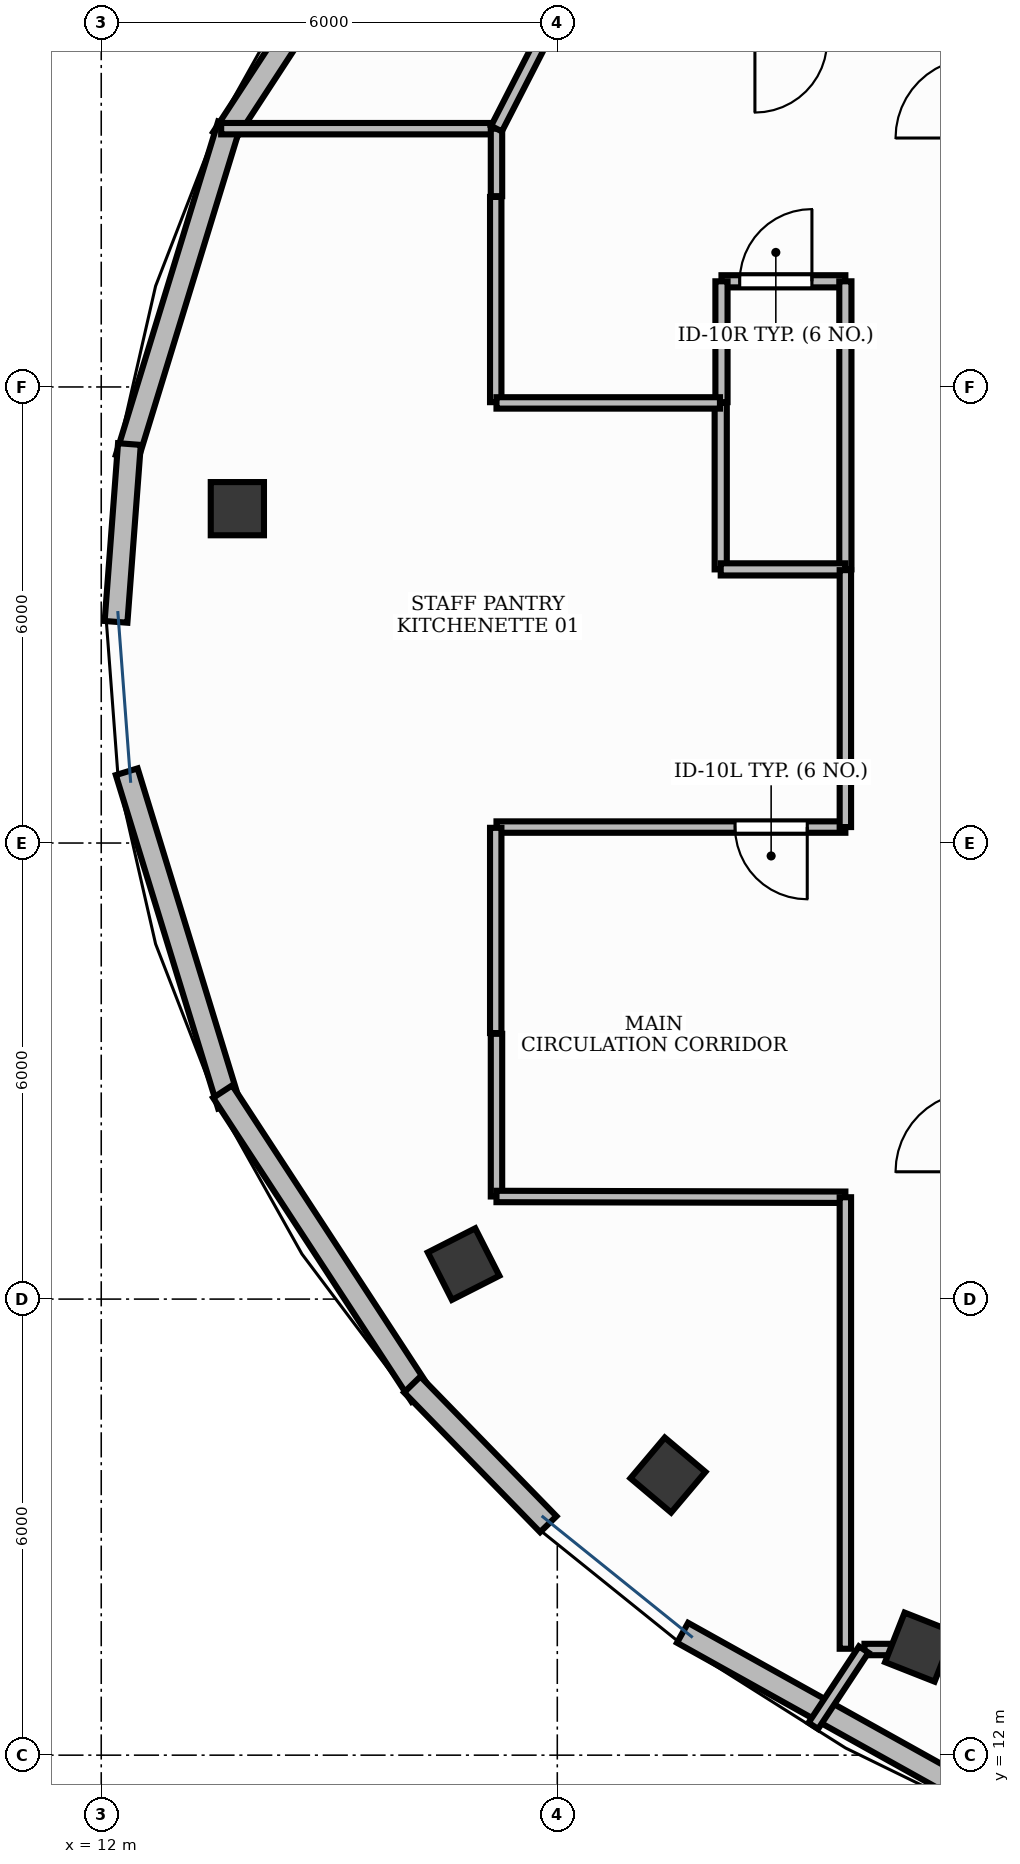
"""IFC4 building model, lengths in metres.
Left out: names, types, materials, properties, quantities, classifications, styles, units other than length and angle.
Written with IfcOpenShell. Run it as: python <this file> out.ifc"""

import sys

from ifc_helpers import new_model, si_unit, direction, frame, frame_2d, origin, origin_2d, place, context, subcontext, project, spatial, rectangle, extrude, element, fill, save


model = new_model("IFC4")
c1 = context("Model", 3, precision=1e-05, world=origin(), true_north=direction((0.0, 1.0)))
c2 = subcontext(c1, "Body", "Model", "MODEL_VIEW")
j1 = project(units=[si_unit("LENGTHUNIT", "METRE"), si_unit("PLANEANGLEUNIT", "RADIAN")], contexts=[c1])
p1 = place(None, origin())
s1 = spatial("IfcSite", under=j1, at=p1, CompositionType="ELEMENT")
p2 = place(p1, origin())
s2 = spatial("IfcBuilding", under=s1, at=p2, CompositionType="ELEMENT")
p3 = place(p2, frame((0.0, 0.0, 314.4)))
s3 = spatial("IfcBuildingStorey", under=s2, at=p3, CompositionType="ELEMENT", Elevation=314.4)
for number, where, z_axis, x_axis in (
    (1, (13.791, 28.399, -0.0), (0.0, 0.0, 1.0), (0.0, 1.0, 0.0)),
    (2, (16.767, 18.46, -0.0), (0.0, 0.0, 1.0), (-0.453, 0.891, 0.0)),
    (3, (19.456, 15.685, -0.0), (0.0, 0.0, 1.0), (-0.764, 0.645, 0.0)),
    (4, (22.766, 13.421, -0.0), (0.0, 0.0, 1.0), (-0.93, 0.367, 0.0)),
):
    element("IfcColumn", number, at=place(p3, frame(where, z_axis=z_axis, x_axis=x_axis)), inside=s3, PredefinedType="COLUMN", context=c2, shape_type="SweptSolid", body=[
        extrude(rectangle(XDim=0.7, YDim=0.7, at=origin_2d()), origin(), (0.0, 0.0, 1.0), 3.901),
    ])
p4 = place(p3, frame((16.208, 37.269, 0.0), z_axis=(0.0, 0.0, 1.0), x_axis=(-0.546723072071, -0.837313491152, 0.0)))
e5 = element("IfcWall", 5, at=p4, inside=s3, PredefinedType="STANDARD", context=c2, shape_type="SweptSolid", body=[
    extrude(rectangle(XDim=4.775, YDim=0.3, at=frame_2d((2.388, 0.0))), origin(), (0.0, 0.0, 1.0), 3.9),
])
p5 = place(p3, frame((13.681, 33.449, 0.0), z_axis=(0.0, 0.0, 1.0), x_axis=(-0.293311854667, -0.956016817797, 0.0)))
e6 = element("IfcWall", 6, at=p5, inside=s3, PredefinedType="STANDARD", context=c2, shape_type="SweptSolid", body=[
    extrude(rectangle(XDim=4.589, YDim=0.3, at=frame_2d((2.294, 0.0))), origin(), (0.0, 0.0, 1.0), 3.9),
])
p6 = place(p3, frame((12.371, 29.249, 0.0), z_axis=(0.0, 0.0, 1.0), x_axis=(-0.075040925575, -0.997180454827, 0.0)))
e7 = element("IfcWall", 7, at=p6, inside=s3, PredefinedType="STANDARD", context=c2, shape_type="SweptSolid", body=[
    extrude(rectangle(XDim=2.346, YDim=0.3, at=frame_2d((1.173, 0.0))), origin(), (0.0, 0.0, 1.0), 3.9),
])
p7 = place(p3, frame((12.335, 24.938, 0.0), z_axis=(0.0, 0.0, 1.0), x_axis=(0.293311854667, -0.956016817797, 0.0)))
e8 = element("IfcWall", 8, at=p7, inside=s3, PredefinedType="STANDARD", context=c2, shape_type="SweptSolid", body=[
    extrude(rectangle(XDim=4.589, YDim=0.3, at=frame_2d((2.294, 0.0))), origin(), (0.0, 0.0, 1.0), 3.9),
])
p8 = place(p3, frame((13.598, 20.73, 0.0), z_axis=(0.0, 0.0, 1.0), x_axis=(0.546723072071, -0.837313491152, 0.0)))
e9 = element("IfcWall", 9, at=p8, inside=s3, PredefinedType="STANDARD", context=c2, shape_type="SweptSolid", body=[
    extrude(rectangle(XDim=4.775, YDim=0.3, at=frame_2d((2.388, 0.0))), origin(), (0.0, 0.0, 1.0), 3.9),
])
p9 = place(p3, frame((16.092, 16.877, 0.0), z_axis=(0.0, 0.0, 1.0), x_axis=(0.697621825822, -0.716466180735, 0.0)))
e10 = element("IfcWall", 10, at=p9, inside=s3, PredefinedType="STANDARD", context=c2, shape_type="SweptSolid", body=[
    extrude(rectangle(XDim=2.565, YDim=0.3, at=frame_2d((1.283, 0.0))), origin(), (0.0, 0.0, 1.0), 3.9),
])
p10 = place(p3, frame((19.648, 13.61, 0.0), z_axis=(0.0, 0.0, 1.0), x_axis=(0.87350676692, -0.486812004932, 0.0)))
e11 = element("IfcWall", 11, at=p10, inside=s3, PredefinedType="STANDARD", context=c2, shape_type="SweptSolid", body=[
    extrude(rectangle(XDim=5.282, YDim=0.3, at=frame_2d((2.641, 0.0))), origin(), (0.0, 0.0, 1.0), 3.9),
])
p11 = place(p3, frame((20.16, 31.39, 0.0), z_axis=(0.0, 0.0, 1.0), x_axis=(1.0, 0.0, 0.0)))
e12 = element("IfcWall", 12, at=p11, inside=s3, PredefinedType="PARTITIONING", context=c2, shape_type="SweptSolid", body=[
    extrude(rectangle(XDim=1.63, YDim=0.16, at=frame_2d((0.815, 0.0))), origin(), (0.0, 0.0, 1.0), 2.22),
])
p12 = place(p11, frame((0.24, 0.0, 0.0)))
e13 = element("IfcOpeningElement", 13, at=p12, cuts=e12, PredefinedType="OPENING", context=c2, shape_type="SweptSolid", body=[
    extrude(rectangle(XDim=0.95, YDim=2.15, at=frame_2d((0.475, 1.075))), frame((0.0, 0.095, 0.0), z_axis=(0.0, -1.0, 0.0), x_axis=(1.0, 0.0, 0.0)), (0.0, 0.0, 1.0), 0.19),
])
p13 = place(p3, frame((21.79, 24.21, 0.0), z_axis=(0.0, 0.0, 1.0), x_axis=(-1.0, 0.0, 0.0)))
e14 = element("IfcWall", 14, at=p13, inside=s3, PredefinedType="PARTITIONING", context=c2, shape_type="SweptSolid", body=[
    extrude(rectangle(XDim=4.59, YDim=0.15, at=frame_2d((2.295, 0.0))), origin(), (0.0, 0.0, 1.0), 2.22),
])
p14 = place(p13, frame((0.502, 0.0, 0.0)))
e15 = element("IfcOpeningElement", 15, at=p14, cuts=e14, PredefinedType="OPENING", context=c2, shape_type="SweptSolid", body=[
    extrude(rectangle(XDim=0.95, YDim=2.15, at=frame_2d((0.475, 1.075))), frame((0.0, 0.09, 0.0), z_axis=(0.0, -1.0, 0.0), x_axis=(1.0, 0.0, 0.0)), (0.0, 0.0, 1.0), 0.18),
])
p15 = place(p3, frame((22.041, 13.39, 0.0), z_axis=(0.0, 0.0, 1.0), x_axis=(1.0, 0.0, 0.0)))
e16 = element("IfcWall", 16, at=p15, inside=s3, PredefinedType="PARTITIONING", context=c2, shape_type="SweptSolid", body=[
    extrude(rectangle(XDim=17.359, YDim=0.15, at=frame_2d((8.679, 0.0))), origin(), (0.0, 0.0, 1.0), 2.22),
])
p16 = place(p15, frame((8.634, 0.0, 0.0)))
e17 = element("IfcOpeningElement", 17, at=p16, cuts=e16, PredefinedType="OPENING", context=c2, shape_type="SweptSolid", body=[
    extrude(rectangle(XDim=0.95, YDim=2.15, at=frame_2d((0.475, 1.075))), frame((0.0, 0.09, 0.0), z_axis=(0.0, -1.0, 0.0), x_axis=(1.0, 0.0, 0.0)), (0.0, 0.0, 1.0), 0.18),
])
p17 = place(p3, frame((20.15, 27.6, 0.0), z_axis=(0.0, 0.0, 1.0), x_axis=(0.0, 1.0, 0.0)))
e18 = element("IfcWall", 18, at=p17, inside=s3, PredefinedType="PARTITIONING", context=c2, shape_type="SweptSolid", body=[
    extrude(rectangle(XDim=2.19, YDim=0.16, at=frame_2d((1.095, 0.0))), origin(), (0.0, 0.0, 1.0), 2.22),
])
p18 = place(p3, frame((20.16, 29.8, 0.0), z_axis=(0.0, 0.0, 1.0), x_axis=(0.0, 1.0, 0.0)))
e19 = element("IfcWall", 19, at=p18, inside=s3, PredefinedType="PARTITIONING", context=c2, shape_type="SweptSolid", body=[
    extrude(rectangle(XDim=1.59, YDim=0.16, at=frame_2d((0.795, 0.0))), origin(), (0.0, 0.0, 1.0), 2.22),
])
p19 = place(p3, frame((21.79, 31.39, 0.0), z_axis=(0.0, 0.0, 1.0), x_axis=(0.0, -1.0, 0.0)))
e20 = element("IfcWall", 20, at=p19, inside=s3, PredefinedType="PARTITIONING", context=c2, shape_type="SweptSolid", body=[
    extrude(rectangle(XDim=3.79, YDim=0.16, at=frame_2d((1.895, 0.0))), origin(), (0.0, 0.0, 1.0), 2.22),
])
p20 = place(p3, frame((21.79, 27.6, 0.0), z_axis=(0.0, 0.0, 1.0), x_axis=(-1.0, 0.0, 0.0)))
e21 = element("IfcWall", 21, at=p20, inside=s3, PredefinedType="PARTITIONING", context=c2, shape_type="SweptSolid", body=[
    extrude(rectangle(XDim=1.64, YDim=0.16, at=frame_2d((0.82, 0.0))), origin(), (0.0, 0.0, 1.0), 2.22),
])
p21 = place(p3, frame((13.578, 33.398, 0.0), z_axis=(0.0, 0.0, 1.0), x_axis=(1.0, 0.0, 0.0)))
e22 = element("IfcWall", 22, at=p21, inside=s3, PredefinedType="PARTITIONING", context=c2, shape_type="SweptSolid", body=[
    extrude(rectangle(XDim=3.622, YDim=0.15, at=frame_2d((1.811, 0.0))), origin(), (0.0, 0.0, 1.0), 2.22),
])
p22 = place(p3, frame((17.2, 33.398, 0.0), z_axis=(0.0, 0.0, 1.0), x_axis=(0.0, -1.0, 0.0)))
e23 = element("IfcWall", 23, at=p22, inside=s3, PredefinedType="PARTITIONING", context=c2, shape_type="SweptSolid", body=[
    extrude(rectangle(XDim=0.888, YDim=0.15, at=frame_2d((0.444, 0.0))), origin(), (0.0, 0.0, 1.0), 2.22),
])
p23 = place(p3, frame((17.19, 32.5, 0.0), z_axis=(0.0, 0.0, 1.0), x_axis=(0.0, -1.0, 0.0)))
e24 = element("IfcWall", 24, at=p23, inside=s3, PredefinedType="PARTITIONING", context=c2, shape_type="SweptSolid", body=[
    extrude(rectangle(XDim=2.7, YDim=0.15, at=frame_2d((1.35, 0.0))), origin(), (0.0, 0.0, 1.0), 2.22),
])
p24 = place(p3, frame((17.2, 29.79, 0.0), z_axis=(0.0, 0.0, 1.0), x_axis=(1.0, 0.0, 0.0)))
e25 = element("IfcWall", 25, at=p24, inside=s3, PredefinedType="PARTITIONING", context=c2, shape_type="SweptSolid", body=[
    extrude(rectangle(XDim=2.94, YDim=0.15, at=frame_2d((1.47, 0.0))), origin(), (0.0, 0.0, 1.0), 2.22),
])
p25 = place(p3, frame((21.79, 27.59, 0.0), z_axis=(0.0, 0.0, 1.0), x_axis=(0.0, -1.0, 0.0)))
e26 = element("IfcWall", 26, at=p25, inside=s3, PredefinedType="PARTITIONING", context=c2, shape_type="SweptSolid", body=[
    extrude(rectangle(XDim=3.38, YDim=0.15, at=frame_2d((1.69, 0.0))), origin(), (0.0, 0.0, 1.0), 2.22),
])
p26 = place(p3, frame((17.19, 24.2, 0.0), z_axis=(0.0, 0.0, 1.0), x_axis=(0.0, -1.0, 0.0)))
e27 = element("IfcWall", 27, at=p26, inside=s3, PredefinedType="PARTITIONING", context=c2, shape_type="SweptSolid", body=[
    extrude(rectangle(XDim=2.7, YDim=0.15, at=frame_2d((1.35, 0.0))), origin(), (0.0, 0.0, 1.0), 2.22),
])
p27 = place(p3, frame((17.2, 21.49, 0.0), z_axis=(0.0, 0.0, 1.0), x_axis=(0.0, -1.0, 0.0)))
e28 = element("IfcWall", 28, at=p27, inside=s3, PredefinedType="PARTITIONING", context=c2, shape_type="SweptSolid", body=[
    extrude(rectangle(XDim=2.14, YDim=0.15, at=frame_2d((1.07, 0.0))), origin(), (0.0, 0.0, 1.0), 2.22),
])
p28 = place(p3, frame((17.2, 19.35, 0.0), z_axis=(0.0, 0.0, 1.0), x_axis=(0.999997622206, -0.002180729882, 0.0)))
e29 = element("IfcWall", 29, at=p28, inside=s3, PredefinedType="PARTITIONING", context=c2, shape_type="SweptSolid", body=[
    extrude(rectangle(XDim=4.59, YDim=0.15, at=frame_2d((2.295, 0.0))), origin(), (0.0, 0.0, 1.0), 2.22),
])
p29 = place(p3, frame((21.79, 19.34, 0.0), z_axis=(0.0, 0.0, 1.0), x_axis=(0.0, -1.0, 0.0)))
e30 = element("IfcWall", 30, at=p29, inside=s3, PredefinedType="PARTITIONING", context=c2, shape_type="SweptSolid", body=[
    extrude(rectangle(XDim=5.94, YDim=0.15, at=frame_2d((2.97, 0.0))), origin(), (0.0, 0.0, 1.0), 2.22),
])
p30 = place(p3, frame((22.031, 13.39, 0.0), z_axis=(0.0, 0.0, 1.0), x_axis=(-0.550618818577, -0.834756800888, 0.0)))
e31 = element("IfcWall", 31, at=p30, inside=s3, PredefinedType="PARTITIONING", context=c2, shape_type="SweptSolid", body=[
    extrude(rectangle(XDim=1.203, YDim=0.15, at=frame_2d((0.602, 0.0))), origin(), (0.0, 0.0, 1.0), 2.22),
])
p31 = place(p3, frame((17.79, 34.55, 0.0), z_axis=(0.0, 0.0, 1.0), x_axis=(-0.455868581402, -0.890047097906, 0.0)))
e32 = element("IfcWall", 32, at=p31, inside=s3, PredefinedType="PARTITIONING", context=c2, shape_type="SweptSolid", body=[
    extrude(rectangle(XDim=1.294, YDim=0.16, at=frame_2d((0.647, 0.0))), origin(), (0.0, 0.0, 1.0), 2.22),
])
p32 = place(p12, origin())
e33 = element("IfcDoor", 33, at=p32, inside=s3, OperationType="SINGLE_SWING_RIGHT", PredefinedType="DOOR", context=c2, shape_type="SweptSolid", body=[
    extrude(rectangle(XDim=0.95, YDim=2.15, at=frame_2d((0.475, 1.075))), frame((0.0, 0.025, 0.0), z_axis=(0.0, -1.0, 0.0), x_axis=(1.0, 0.0, 0.0)), (0.0, 0.0, 1.0), 0.05),
])
fill(e13, e33)
p33 = place(p14, origin())
e34 = element("IfcDoor", 34, at=p33, inside=s3, OperationType="SINGLE_SWING_LEFT", PredefinedType="DOOR", context=c2, shape_type="SweptSolid", body=[
    extrude(rectangle(XDim=0.95, YDim=2.15, at=frame_2d((0.475, 1.075))), frame((0.0, 0.025, 0.0), z_axis=(0.0, -1.0, 0.0), x_axis=(1.0, 0.0, 0.0)), (0.0, 0.0, 1.0), 0.05),
])
fill(e15, e34)
save(model, sys.argv[1])
